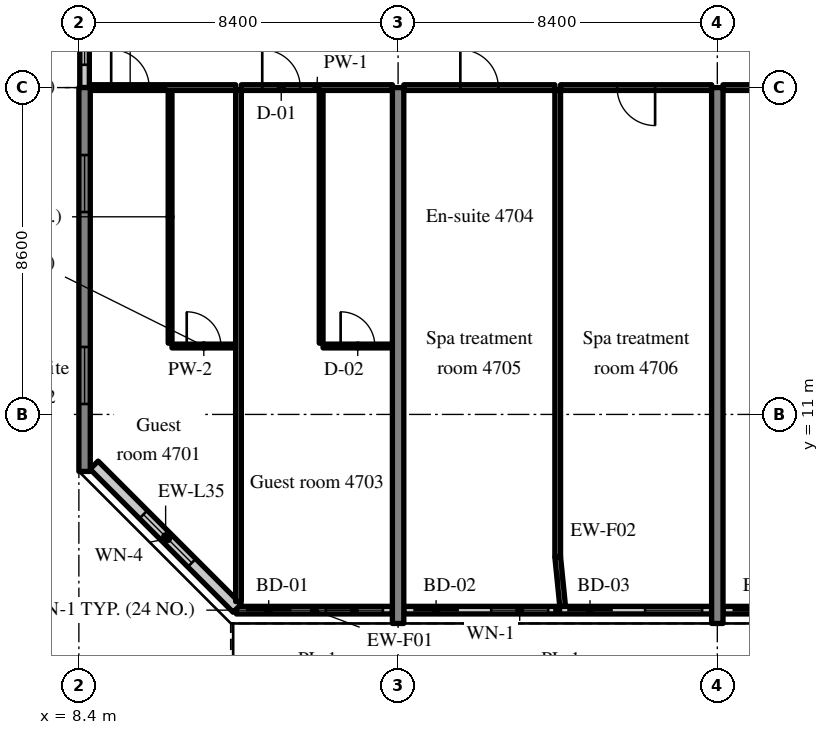
"""IFC4 building model, lengths in metres.
Left out: names, types, materials, properties, quantities, classifications, styles, units other than length and angle.
Written with IfcOpenShell. Run it as: python <this file> out.ifc"""

import sys

from ifc_helpers import new_model, si_unit, direction, frame, frame_2d, origin, place, context, subcontext, project, spatial, rectangle, extrude, source, transform, mapped, element, fill, save


model = new_model("IFC4")
c1 = context("Model", 3, precision=1e-05, world=origin(), true_north=direction((0.0, 1.0)))
c2 = subcontext(c1, "Body", "Model", "MODEL_VIEW")
j1 = project(units=[si_unit("LENGTHUNIT", "METRE"), si_unit("PLANEANGLEUNIT", "RADIAN")], contexts=[c1])
p1 = place(None, origin())
s1 = spatial("IfcSite", under=j1, at=p1, CompositionType="ELEMENT")
p2 = place(p1, origin())
s2 = spatial("IfcBuilding", under=s1, at=p2, CompositionType="ELEMENT")
p3 = place(p2, frame((0.0, 0.0, 193.4)))
s3 = spatial("IfcBuildingStorey", under=s2, at=p3, CompositionType="ELEMENT", Elevation=193.4)
m1 = source(origin(), c2, "Body", "SweptSolid", [
    extrude(rectangle(XDim=10.1, YDim=0.3, at=frame_2d((5.05, 0.0))), origin(), (0.0, 0.0, 1.0), 3.52),
])
p4 = place(p3, frame((8.55, 9.5, 0.0), z_axis=(0.0, 0.0, 1.0), x_axis=(0.0, 1.0, 0.0)))
e1 = element("IfcWall", 1, at=p4, inside=s3, PredefinedType="SHEAR", context=c2, shape_type="MappedRepresentation", body=[
    mapped(m1, transform((0.0, 0.0, 0.0), scale=1.0)),
])
m2 = source(origin(), c2, "Body", "SweptSolid", [
    extrude(rectangle(XDim=1.5, YDim=1.5, at=frame_2d((0.75, 0.75))), frame((0.0, 0.16, 0.0), z_axis=(0.0, -1.0, 0.0), x_axis=(1.0, 0.0, 0.0)), (0.0, 0.0, 1.0), 0.32),
])
p5 = place(p4, frame((1.775, 0.0, 0.9)))
e2 = element("IfcOpeningElement", 2, at=p5, cuts=e1, PredefinedType="OPENING", context=c2, shape_type="MappedRepresentation", body=[
    mapped(m2, transform((0.0, 0.0, 0.0), scale=1.0)),
])
p6 = place(p4, frame((6.825, 0.0, 0.9)))
e3 = element("IfcOpeningElement", 3, at=p6, cuts=e1, PredefinedType="OPENING", context=c2, shape_type="MappedRepresentation", body=[
    mapped(m2, transform((0.0, 0.0, 0.0), scale=1.0)),
])
m3 = source(origin(), c2, "Body", "SweptSolid", [
    extrude(rectangle(XDim=14.1, YDim=0.3, at=frame_2d((7.05, 0.0))), origin(), (0.0, 0.0, 1.0), 3.52),
])
for number, where, z_axis, x_axis in (
    (4, (16.8, 5.5, 0.0), (0.0, 0.0, 1.0), (0.0, 1.0, 0.0)),
    (5, (25.2, 5.5, 0.0), (0.0, 0.0, 1.0), (0.0, 1.0, 0.0)),
):
    element("IfcWall", number, at=place(p3, frame(where, z_axis=z_axis, x_axis=x_axis)), inside=s3, PredefinedType="SHEAR", context=c2, shape_type="MappedRepresentation", body=[
        mapped(m3, transform((0.0, 0.0, 0.0), scale=1.0)),
    ])
m4 = source(origin(), c2, "Body", "SweptSolid", [
    extrude(rectangle(XDim=4.105, YDim=0.2, at=frame_2d((2.052, 0.0))), origin(), (0.0, 0.0, 1.0), 2.87),
])
p7 = place(p3, frame((12.545, 5.85, 0.0), z_axis=(0.0, 0.0, 1.0), x_axis=(1.0, 0.0, 0.0)))
e6 = element("IfcWall", 6, at=p7, inside=s3, PredefinedType="SOLIDWALL", context=c2, shape_type="MappedRepresentation", body=[
    mapped(m4, transform((0.0, 0.0, 0.0), scale=1.0)),
])
m5 = source(origin(), c2, "Body", "SweptSolid", [
    extrude(rectangle(XDim=1.2, YDim=2.4, at=frame_2d((0.6, 1.2))), frame((0.0, 0.11, 0.0), z_axis=(0.0, -1.0, 0.0), x_axis=(1.0, 0.0, 0.0)), (0.0, 0.0, 1.0), 0.22),
])
p8 = place(p7, frame((0.25, 0.0, 0.0)))
e7 = element("IfcOpeningElement", 7, at=p8, cuts=e6, PredefinedType="OPENING", context=c2, shape_type="MappedRepresentation", body=[
    mapped(m5, transform((0.0, 0.0, 0.0), scale=1.0)),
])
m6 = source(origin(), c2, "Body", "SweptSolid", [
    extrude(rectangle(XDim=1.5, YDim=1.5, at=frame_2d((0.75, 0.75))), frame((0.0, 0.11, 0.0), z_axis=(0.0, -1.0, 0.0), x_axis=(1.0, 0.0, 0.0)), (0.0, 0.0, 1.0), 0.22),
])
p9 = place(p7, frame((2.355, 0.0, 0.9)))
e8 = element("IfcOpeningElement", 8, at=p9, cuts=e6, PredefinedType="OPENING", context=c2, shape_type="MappedRepresentation", body=[
    mapped(m6, transform((0.0, 0.0, 0.0), scale=1.0)),
])
m7 = source(origin(), c2, "Body", "SweptSolid", [
    extrude(rectangle(XDim=8.1, YDim=0.2, at=frame_2d((4.05, 0.0))), origin(), (0.0, 0.0, 1.0), 2.87),
])
p10 = place(p3, frame((16.95, 5.85, 0.0), z_axis=(0.0, 0.0, 1.0), x_axis=(1.0, 0.0, 0.0)))
e9 = element("IfcWall", 9, at=p10, inside=s3, PredefinedType="SOLIDWALL", context=c2, shape_type="MappedRepresentation", body=[
    mapped(m7, transform((0.0, 0.0, 0.0), scale=1.0)),
])
p11 = place(p10, frame((0.25, 0.0, 0.0)))
e10 = element("IfcOpeningElement", 10, at=p11, cuts=e9, PredefinedType="OPENING", context=c2, shape_type="MappedRepresentation", body=[
    mapped(m5, transform((0.0, 0.0, 0.0), scale=1.0)),
])
p12 = place(p10, frame((2.3, 0.0, 0.9)))
e11 = element("IfcOpeningElement", 11, at=p12, cuts=e9, PredefinedType="OPENING", context=c2, shape_type="MappedRepresentation", body=[
    mapped(m6, transform((0.0, 0.0, 0.0), scale=1.0)),
])
p13 = place(p10, frame((4.3, 0.0, 0.0)))
e12 = element("IfcOpeningElement", 12, at=p13, cuts=e9, PredefinedType="OPENING", context=c2, shape_type="MappedRepresentation", body=[
    mapped(m5, transform((0.0, 0.0, 0.0), scale=1.0)),
])
p14 = place(p10, frame((6.35, 0.0, 0.9)))
e13 = element("IfcOpeningElement", 13, at=p14, cuts=e9, PredefinedType="OPENING", context=c2, shape_type="MappedRepresentation", body=[
    mapped(m6, transform((0.0, 0.0, 0.0), scale=1.0)),
])
m8 = source(origin(), c2, "Body", "SweptSolid", [
    extrude(rectangle(XDim=8.1, YDim=0.2, at=frame_2d((4.05, 0.0))), origin(), (0.0, 0.0, 1.0), 2.87),
])
p15 = place(p3, frame((25.35, 5.85, 0.0), z_axis=(0.0, 0.0, 1.0), x_axis=(1.0, 0.0, 0.0)))
e14 = element("IfcWall", 14, at=p15, inside=s3, PredefinedType="SOLIDWALL", context=c2, shape_type="MappedRepresentation", body=[
    mapped(m8, transform((0.0, 0.0, 0.0), scale=1.0)),
])
p16 = place(p15, frame((0.25, 0.0, 0.0)))
e15 = element("IfcOpeningElement", 15, at=p16, cuts=e14, PredefinedType="OPENING", context=c2, shape_type="MappedRepresentation", body=[
    mapped(m5, transform((0.0, 0.0, 0.0), scale=1.0)),
])
p17 = place(p15, frame((2.3, 0.0, 0.9)))
e16 = element("IfcOpeningElement", 16, at=p17, cuts=e14, PredefinedType="OPENING", context=c2, shape_type="MappedRepresentation", body=[
    mapped(m6, transform((0.0, 0.0, 0.0), scale=1.0)),
])
p18 = place(p15, frame((4.3, 0.0, 0.0)))
e17 = element("IfcOpeningElement", 17, at=p18, cuts=e14, PredefinedType="OPENING", context=c2, shape_type="MappedRepresentation", body=[
    mapped(m5, transform((0.0, 0.0, 0.0), scale=1.0)),
])
p19 = place(p15, frame((6.35, 0.0, 0.9)))
e18 = element("IfcOpeningElement", 18, at=p19, cuts=e14, PredefinedType="OPENING", context=c2, shape_type="MappedRepresentation", body=[
    mapped(m6, transform((0.0, 0.0, 0.0), scale=1.0)),
])
m9 = source(origin(), c2, "Body", "SweptSolid", [
    extrude(rectangle(XDim=5.326, YDim=0.3, at=frame_2d((2.663, 0.0))), origin(), (0.0, 0.0, 1.0), 3.52),
])
p20 = place(p3, frame((8.8, 9.666, 0.0), z_axis=(0.0, 0.0, 1.0), x_axis=(0.707083859269, -0.707129702361, 0.0)))
e19 = element("IfcWall", 19, at=p20, inside=s3, PredefinedType="SOLIDWALL", context=c2, shape_type="MappedRepresentation", body=[
    mapped(m9, transform((0.0, 0.0, 0.0), scale=1.0)),
])
m10 = source(origin(), c2, "Body", "SweptSolid", [
    extrude(rectangle(XDim=1.8, YDim=1.5, at=frame_2d((0.9, 0.75))), frame((0.0, 0.16, 0.0), z_axis=(0.0, -1.0, 0.0), x_axis=(1.0, 0.0, 0.0)), (0.0, 0.0, 1.0), 0.32),
])
p21 = place(p20, frame((1.836, 0.0, 0.9)))
e20 = element("IfcOpeningElement", 20, at=p21, cuts=e19, PredefinedType="OPENING", context=c2, shape_type="MappedRepresentation", body=[
    mapped(m10, transform((0.0, 0.0, 0.0), scale=1.0)),
])
m11 = source(origin(), c2, "Body", "SweptSolid", [
    extrude(rectangle(XDim=2.4, YDim=0.25, at=frame_2d((1.2, 0.0))), origin(), (0.0, 0.0, 1.0), 2.62),
])
p22 = place(p3, frame((8.55, 19.6, 0.0), z_axis=(0.0, 0.0, 1.0), x_axis=(0.0, 1.0, 0.0)))
e21 = element("IfcWall", 21, at=p22, inside=s3, PredefinedType="SOLIDWALL", context=c2, shape_type="MappedRepresentation", body=[
    mapped(m11, transform((0.0, 0.0, 0.0), scale=1.0)),
])
m12 = source(origin(), c2, "Body", "SweptSolid", [
    extrude(rectangle(XDim=1.2, YDim=1.5, at=frame_2d((0.6, 0.75))), frame((0.0, 0.135, 0.0), z_axis=(0.0, -1.0, 0.0), x_axis=(1.0, 0.0, 0.0)), (0.0, 0.0, 1.0), 0.27),
])
p23 = place(p22, frame((0.6, 0.0, 0.9)))
e22 = element("IfcOpeningElement", 22, at=p23, cuts=e21, PredefinedType="OPENING", context=c2, shape_type="MappedRepresentation", body=[
    mapped(m12, transform((0.0, 0.0, 0.0), scale=1.0)),
])
m13 = source(origin(), c2, "Body", "SweptSolid", [
    extrude(rectangle(XDim=6.65, YDim=0.1, at=frame_2d((3.325, 0.0))), origin(), (0.0, 0.0, 1.0), 3.52),
])
p24 = place(p3, frame((10.8, 12.875, 0.0), z_axis=(0.0, 0.0, 1.0), x_axis=(0.0, 1.0, 0.0)))
e23 = element("IfcWall", 23, at=p24, inside=s3, PredefinedType="PARTITIONING", context=c2, shape_type="MappedRepresentation", body=[
    mapped(m13, transform((0.0, 0.0, 0.0), scale=1.0)),
])
m14 = source(origin(), c2, "Body", "SweptSolid", [
    extrude(rectangle(XDim=1.675, YDim=0.1, at=frame_2d((0.837, 0.0))), origin(), (0.0, 0.0, 1.0), 3.52),
])
p25 = place(p3, frame((10.85, 12.8, 0.0), z_axis=(0.0, 0.0, 1.0), x_axis=(1.0, 0.0, 0.0)))
e24 = element("IfcWall", 24, at=p25, inside=s3, PredefinedType="PARTITIONING", context=c2, shape_type="MappedRepresentation", body=[
    mapped(m14, transform((0.0, 0.0, 0.0), scale=1.0)),
])
m15 = source(origin(), c2, "Body", "SweptSolid", [
    extrude(rectangle(XDim=0.9, YDim=2.1, at=frame_2d((0.45, 1.05))), frame((0.0, 0.06, 0.0), z_axis=(0.0, -1.0, 0.0), x_axis=(1.0, 0.0, 0.0)), (0.0, 0.0, 1.0), 0.12),
])
p26 = place(p25, frame((0.388, 0.0, 0.0)))
e25 = element("IfcOpeningElement", 25, at=p26, cuts=e24, PredefinedType="OPENING", context=c2, shape_type="MappedRepresentation", body=[
    mapped(m15, transform((0.0, 0.0, 0.0), scale=1.0)),
])
m16 = source(origin(), c2, "Body", "SweptSolid", [
    extrude(rectangle(XDim=3.825, YDim=0.15, at=frame_2d((1.913, 0.0))), origin(), (0.0, 0.0, 1.0), 2.82),
])
p27 = place(p3, frame((8.7, 19.6, 0.0), z_axis=(0.0, 0.0, 1.0), x_axis=(1.0, 0.0, 0.0)))
e26 = element("IfcWall", 26, at=p27, inside=s3, PredefinedType="PARTITIONING", context=c2, shape_type="MappedRepresentation", body=[
    mapped(m16, transform((0.0, 0.0, 0.0), scale=1.0)),
])
m17 = source(origin(), c2, "Body", "SweptSolid", [
    extrude(rectangle(XDim=1.0, YDim=2.1, at=frame_2d((0.5, 1.05))), frame((0.0, 0.085, 0.0), z_axis=(0.0, -1.0, 0.0), x_axis=(1.0, 0.0, 0.0)), (0.0, 0.0, 1.0), 0.17),
])
p28 = place(p27, frame((0.55, 0.0, 0.0)))
e27 = element("IfcOpeningElement", 27, at=p28, cuts=e26, PredefinedType="OPENING", context=c2, shape_type="MappedRepresentation", body=[
    mapped(m17, transform((0.0, 0.0, 0.0), scale=1.0)),
])
p29 = place(p3, frame((14.775, 12.875, 0.0), z_axis=(0.0, 0.0, 1.0), x_axis=(0.0, 1.0, 0.0)))
e28 = element("IfcWall", 28, at=p29, inside=s3, PredefinedType="PARTITIONING", context=c2, shape_type="MappedRepresentation", body=[
    mapped(m13, transform((0.0, 0.0, 0.0), scale=1.0)),
])
m18 = source(origin(), c2, "Body", "SweptSolid", [
    extrude(rectangle(XDim=1.825, YDim=0.1, at=frame_2d((0.913, 0.0))), origin(), (0.0, 0.0, 1.0), 3.52),
])
p30 = place(p3, frame((14.825, 12.8, 0.0), z_axis=(0.0, 0.0, 1.0), x_axis=(1.0, 0.0, 0.0)))
e29 = element("IfcWall", 29, at=p30, inside=s3, PredefinedType="PARTITIONING", context=c2, shape_type="MappedRepresentation", body=[
    mapped(m18, transform((0.0, 0.0, 0.0), scale=1.0)),
])
p31 = place(p30, frame((0.463, 0.0, 0.0)))
e30 = element("IfcOpeningElement", 30, at=p31, cuts=e29, PredefinedType="OPENING", context=c2, shape_type="MappedRepresentation", body=[
    mapped(m15, transform((0.0, 0.0, 0.0), scale=1.0)),
])
m19 = source(origin(), c2, "Body", "SweptSolid", [
    extrude(rectangle(XDim=3.975, YDim=0.15, at=frame_2d((1.987, 0.0))), origin(), (0.0, 0.0, 1.0), 2.82),
])
p32 = place(p3, frame((12.675, 19.6, 0.0), z_axis=(0.0, 0.0, 1.0), x_axis=(1.0, 0.0, 0.0)))
e31 = element("IfcWall", 31, at=p32, inside=s3, PredefinedType="PARTITIONING", context=c2, shape_type="MappedRepresentation", body=[
    mapped(m19, transform((0.0, 0.0, 0.0), scale=1.0)),
])
p33 = place(p32, frame((0.55, 0.0, 0.0)))
e32 = element("IfcOpeningElement", 32, at=p33, cuts=e31, PredefinedType="OPENING", context=c2, shape_type="MappedRepresentation", body=[
    mapped(m17, transform((0.0, 0.0, 0.0), scale=1.0)),
])
m20 = source(origin(), c2, "Body", "SweptSolid", [
    extrude(rectangle(XDim=13.447, YDim=0.15, at=frame_2d((6.724, 0.0))), origin(), (0.0, 0.0, 1.0), 3.52),
])
p34 = place(p3, frame((12.6, 6.078, 0.0), z_axis=(0.0, 0.0, 1.0), x_axis=(0.0, 1.0, 0.0)))
e33 = element("IfcWall", 33, at=p34, inside=s3, PredefinedType="PARTITIONING", context=c2, shape_type="MappedRepresentation", body=[
    mapped(m20, transform((0.0, 0.0, 0.0), scale=1.0)),
])
m21 = source(origin(), c2, "Body", "SweptSolid", [
    extrude(rectangle(XDim=3.975, YDim=0.15, at=frame_2d((1.988, 0.0))), origin(), (0.0, 0.0, 1.0), 2.82),
])
p35 = place(p3, frame((16.95, 19.6, 0.0), z_axis=(0.0, 0.0, 1.0), x_axis=(1.0, 0.0, 0.0)))
e34 = element("IfcWall", 34, at=p35, inside=s3, PredefinedType="PARTITIONING", context=c2, shape_type="MappedRepresentation", body=[
    mapped(m21, transform((0.0, 0.0, 0.0), scale=1.0)),
])
p36 = place(p35, frame((1.488, 0.0, 0.0)))
e35 = element("IfcOpeningElement", 35, at=p36, cuts=e34, PredefinedType="OPENING", context=c2, shape_type="MappedRepresentation", body=[
    mapped(m17, transform((0.0, 0.0, 0.0), scale=1.0)),
])
p37 = place(p3, frame((21.075, 19.6, 0.0), z_axis=(0.0, 0.0, 1.0), x_axis=(1.0, 0.0, 0.0)))
e36 = element("IfcWall", 36, at=p37, inside=s3, PredefinedType="PARTITIONING", context=c2, shape_type="MappedRepresentation", body=[
    mapped(m21, transform((0.0, 0.0, 0.0), scale=1.0)),
])
p38 = place(p37, frame((1.488, 0.0, 0.0)))
e37 = element("IfcOpeningElement", 37, at=p38, cuts=e36, PredefinedType="OPENING", context=c2, shape_type="MappedRepresentation", body=[
    mapped(m17, transform((0.0, 0.0, 0.0), scale=1.0)),
])
m22 = source(origin(), c2, "Body", "SweptSolid", [
    extrude(rectangle(XDim=12.275, YDim=0.15, at=frame_2d((6.137, 0.0))), origin(), (0.0, 0.0, 1.0), 3.52),
])
p39 = place(p3, frame((21.0, 7.25, 0.0), z_axis=(0.0, 0.0, 1.0), x_axis=(0.0, 1.0, 0.0)))
e38 = element("IfcWall", 38, at=p39, inside=s3, PredefinedType="PARTITIONING", context=c2, shape_type="MappedRepresentation", body=[
    mapped(m22, transform((0.0, 0.0, 0.0), scale=1.0)),
])
m23 = source(origin(), c2, "Body", "SweptSolid", [
    extrude(rectangle(XDim=8.1, YDim=0.15, at=frame_2d((4.05, 0.0))), origin(), (0.0, 0.0, 1.0), 2.82),
])
p40 = place(p3, frame((25.35, 19.6, 0.0), z_axis=(0.0, 0.0, 1.0), x_axis=(1.0, 0.0, 0.0)))
e39 = element("IfcWall", 39, at=p40, inside=s3, PredefinedType="PARTITIONING", context=c2, shape_type="MappedRepresentation", body=[
    mapped(m23, transform((0.0, 0.0, 0.0), scale=1.0)),
])
m24 = source(origin(), c2, "Body", "SweptSolid", [
    extrude(rectangle(XDim=1.8, YDim=2.1, at=frame_2d((0.9, 1.05))), frame((0.0, 0.085, 0.0), z_axis=(0.0, -1.0, 0.0), x_axis=(1.0, 0.0, 0.0)), (0.0, 0.0, 1.0), 0.17),
])
p41 = place(p40, frame((3.15, 0.0, 0.0)))
e40 = element("IfcOpeningElement", 40, at=p41, cuts=e39, PredefinedType="OPENING", context=c2, shape_type="MappedRepresentation", body=[
    mapped(m24, transform((0.0, 0.0, 0.0), scale=1.0)),
])
m25 = source(origin(), c2, "Body", "SweptSolid", [
    extrude(rectangle(XDim=1.307, YDim=0.15, at=frame_2d((0.653, 0.0))), origin(), (0.0, 0.0, 1.0), 3.52),
])
p42 = place(p3, frame((21.13, 5.95, 0.0), z_axis=(0.0, 0.0, 1.0), x_axis=(-0.099411212066, 0.995046436562, 0.0)))
e41 = element("IfcWall", 41, at=p42, inside=s3, PredefinedType="PARTITIONING", context=c2, shape_type="MappedRepresentation", body=[
    mapped(m25, transform((0.0, 0.0, 0.0), scale=1.0)),
])
m26 = source(origin(), c2, "Body", "SweptSolid", [
    extrude(rectangle(XDim=1.2, YDim=2.4, at=frame_2d((0.6, 1.2))), frame((0.0, 0.025, 0.0), z_axis=(0.0, -1.0, 0.0), x_axis=(1.0, 0.0, 0.0)), (0.0, 0.0, 1.0), 0.05),
])
p43 = place(p8, origin())
e42 = element("IfcDoor", 42, at=p43, inside=s3, OperationType="SLIDING_TO_LEFT", PredefinedType="DOOR", context=c2, shape_type="MappedRepresentation", body=[
    mapped(m26, transform((0.0, 0.0, 0.0), scale=1.0)),
])
fill(e7, e42)
m27 = source(origin(), c2, "Body", "SweptSolid", [
    extrude(rectangle(XDim=1.5, YDim=1.5, at=frame_2d((0.75, 0.75))), frame((0.0, 0.03, 0.0), z_axis=(0.0, -1.0, 0.0), x_axis=(1.0, 0.0, 0.0)), (0.0, 0.0, 1.0), 0.06),
])
p44 = place(p9, origin())
e43 = element("IfcWindow", 43, at=p44, inside=s3, PartitioningType="SINGLE_PANEL", PredefinedType="WINDOW", context=c2, shape_type="MappedRepresentation", body=[
    mapped(m27, transform((0.0, 0.0, 0.0), scale=1.0)),
])
fill(e8, e43)
p45 = place(p11, origin())
e44 = element("IfcDoor", 44, at=p45, inside=s3, OperationType="SLIDING_TO_RIGHT", PredefinedType="DOOR", context=c2, shape_type="MappedRepresentation", body=[
    mapped(m26, transform((0.0, 0.0, 0.0), scale=1.0)),
])
fill(e10, e44)
p46 = place(p12, origin())
e45 = element("IfcWindow", 45, at=p46, inside=s3, PartitioningType="SINGLE_PANEL", PredefinedType="WINDOW", context=c2, shape_type="MappedRepresentation", body=[
    mapped(m27, transform((0.0, 0.0, 0.0), scale=1.0)),
])
fill(e11, e45)
p47 = place(p13, origin())
e46 = element("IfcDoor", 46, at=p47, inside=s3, OperationType="SLIDING_TO_LEFT", PredefinedType="DOOR", context=c2, shape_type="MappedRepresentation", body=[
    mapped(m26, transform((0.0, 0.0, 0.0), scale=1.0)),
])
fill(e12, e46)
p48 = place(p14, origin())
e47 = element("IfcWindow", 47, at=p48, inside=s3, PartitioningType="SINGLE_PANEL", PredefinedType="WINDOW", context=c2, shape_type="MappedRepresentation", body=[
    mapped(m27, transform((0.0, 0.0, 0.0), scale=1.0)),
])
fill(e13, e47)
p49 = place(p16, origin())
e48 = element("IfcDoor", 48, at=p49, inside=s3, OperationType="SLIDING_TO_RIGHT", PredefinedType="DOOR", context=c2, shape_type="MappedRepresentation", body=[
    mapped(m26, transform((0.0, 0.0, 0.0), scale=1.0)),
])
fill(e15, e48)
m28 = source(origin(), c2, "Body", "SweptSolid", [
    extrude(rectangle(XDim=1.8, YDim=1.5, at=frame_2d((0.9, 0.75))), frame((0.0, 0.03, 0.0), z_axis=(0.0, -1.0, 0.0), x_axis=(1.0, 0.0, 0.0)), (0.0, 0.0, 1.0), 0.06),
])
p50 = place(p21, origin())
e49 = element("IfcWindow", 49, at=p50, inside=s3, PartitioningType="SINGLE_PANEL", PredefinedType="WINDOW", context=c2, shape_type="MappedRepresentation", body=[
    mapped(m28, transform((0.0, 0.0, 0.0), scale=1.0)),
])
fill(e20, e49)
p51 = place(p5, origin())
e50 = element("IfcWindow", 50, at=p51, inside=s3, PartitioningType="SINGLE_PANEL", PredefinedType="WINDOW", context=c2, shape_type="MappedRepresentation", body=[
    mapped(m27, transform((0.0, 0.0, 0.0), scale=1.0)),
])
fill(e2, e50)
p52 = place(p6, origin())
e51 = element("IfcWindow", 51, at=p52, inside=s3, PartitioningType="SINGLE_PANEL", PredefinedType="WINDOW", context=c2, shape_type="MappedRepresentation", body=[
    mapped(m27, transform((0.0, 0.0, 0.0), scale=1.0)),
])
fill(e3, e51)
m29 = source(origin(), c2, "Body", "SweptSolid", [
    extrude(rectangle(XDim=1.2, YDim=1.5, at=frame_2d((0.6, 0.75))), frame((0.0, 0.03, 0.0), z_axis=(0.0, -1.0, 0.0), x_axis=(1.0, 0.0, 0.0)), (0.0, 0.0, 1.0), 0.06),
])
p53 = place(p23, origin())
e52 = element("IfcWindow", 52, at=p53, inside=s3, PartitioningType="SINGLE_PANEL", PredefinedType="WINDOW", context=c2, shape_type="MappedRepresentation", body=[
    mapped(m29, transform((0.0, 0.0, 0.0), scale=1.0)),
])
fill(e22, e52)
m30 = source(origin(), c2, "Body", "SweptSolid", [
    extrude(rectangle(XDim=0.9, YDim=2.1, at=frame_2d((0.45, 1.05))), frame((0.0, 0.025, 0.0), z_axis=(0.0, -1.0, 0.0), x_axis=(1.0, 0.0, 0.0)), (0.0, 0.0, 1.0), 0.05),
])
p54 = place(p26, origin())
e53 = element("IfcDoor", 53, at=p54, inside=s3, OperationType="SINGLE_SWING_LEFT", PredefinedType="DOOR", context=c2, shape_type="MappedRepresentation", body=[
    mapped(m30, transform((0.0, 0.0, 0.0), scale=1.0)),
])
fill(e25, e53)
m31 = source(origin(), c2, "Body", "SweptSolid", [
    extrude(rectangle(XDim=1.0, YDim=2.1, at=frame_2d((0.5, 1.05))), frame((0.0, 0.025, 0.0), z_axis=(0.0, -1.0, 0.0), x_axis=(1.0, 0.0, 0.0)), (0.0, 0.0, 1.0), 0.05),
])
p55 = place(p28, origin())
e54 = element("IfcDoor", 54, at=p55, inside=s3, OperationType="SINGLE_SWING_LEFT", PredefinedType="DOOR", context=c2, shape_type="MappedRepresentation", body=[
    mapped(m31, transform((0.0, 0.0, 0.0), scale=1.0)),
])
fill(e27, e54)
p56 = place(p31, origin())
e55 = element("IfcDoor", 55, at=p56, inside=s3, OperationType="SINGLE_SWING_LEFT", PredefinedType="DOOR", context=c2, shape_type="MappedRepresentation", body=[
    mapped(m30, transform((0.0, 0.0, 0.0), scale=1.0)),
])
fill(e30, e55)
p57 = place(p33, origin())
e56 = element("IfcDoor", 56, at=p57, inside=s3, OperationType="SINGLE_SWING_LEFT", PredefinedType="DOOR", context=c2, shape_type="MappedRepresentation", body=[
    mapped(m31, transform((0.0, 0.0, 0.0), scale=1.0)),
])
fill(e32, e56)
p58 = place(p36, origin())
e57 = element("IfcDoor", 57, at=p58, inside=s3, OperationType="SINGLE_SWING_LEFT", PredefinedType="DOOR", context=c2, shape_type="MappedRepresentation", body=[
    mapped(m31, transform((0.0, 0.0, 0.0), scale=1.0)),
])
fill(e35, e57)
p59 = place(p38, origin())
e58 = element("IfcDoor", 58, at=p59, inside=s3, OperationType="SINGLE_SWING_RIGHT", PredefinedType="DOOR", context=c2, shape_type="MappedRepresentation", body=[
    mapped(m31, transform((0.0, 0.0, 0.0), scale=1.0)),
])
fill(e37, e58)
save(model, sys.argv[1])
